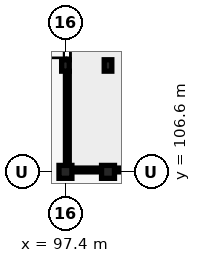
"""IFC4 building model, lengths in metres.
Left out: names, types, materials, properties, quantities, classifications, styles, units other than length and angle.
Written with IfcOpenShell. Run it as: python <this file> out.ifc"""

import sys

from ifc_helpers import new_model, si_unit, direction, frame, frame_2d, origin, origin_2d, place, context, subcontext, project, spatial, rectangle, extrude, element, fill, save


model = new_model("IFC4")
c1 = context("Model", 3, precision=1e-05, world=origin(), true_north=direction((0.0, 1.0)))
c2 = subcontext(c1, "Body", "Model", "MODEL_VIEW")
j1 = project(units=[si_unit("LENGTHUNIT", "METRE"), si_unit("PLANEANGLEUNIT", "RADIAN")], contexts=[c1])
p1 = place(None, origin())
s1 = spatial("IfcSite", under=j1, at=p1, CompositionType="ELEMENT")
p2 = place(p1, origin())
s2 = spatial("IfcBuilding", under=s1, at=p2, CompositionType="ELEMENT")
p3 = place(p2, origin())
s3 = spatial("IfcBuildingStorey", under=s2, at=p3, CompositionType="ELEMENT", Elevation=0.0)
p4 = place(p3, frame((100.2, 106.6, 0.0), z_axis=(0.0, 0.0, 1.0), x_axis=(1.0, 0.0, 0.0)))
e1 = element("IfcColumn", 1, at=p4, inside=s3, PredefinedType="COLUMN", context=c2, shape_type="SweptSolid", body=[
    extrude(rectangle(XDim=0.85, YDim=0.85, at=origin_2d()), origin(), (0.0, 0.0, 1.0), 4.15),
])
p5 = place(p3, frame((100.2, 113.6, 0.0), z_axis=(0.0, 0.0, 1.0), x_axis=(1.0, 0.0, 0.0)))
e2 = element("IfcColumn", 2, at=p5, inside=s3, PredefinedType="COLUMN", context=c2, shape_type="SweptSolid", body=[
    extrude(rectangle(XDim=0.5, YDim=0.75, at=origin_2d()), origin(), (0.0, 0.0, 1.0), 4.15),
])
p6 = place(p3, frame((97.4, 106.6, 0.0), z_axis=(0.0, 0.0, 1.0), x_axis=(1.0, 0.0, 0.0)))
e3 = element("IfcColumn", 3, at=p6, inside=s3, PredefinedType="COLUMN", context=c2, shape_type="SweptSolid", body=[
    extrude(rectangle(XDim=0.85, YDim=0.85, at=origin_2d()), origin(), (0.0, 0.0, 1.0), 4.15),
])
p7 = place(p3, frame((97.4, 113.6, 0.0), z_axis=(0.0, 0.0, 1.0), x_axis=(1.0, 0.0, 0.0)))
e4 = element("IfcColumn", 4, at=p7, inside=s3, PredefinedType="COLUMN", context=c2, shape_type="SweptSolid", body=[
    extrude(rectangle(XDim=0.5, YDim=0.75, at=origin_2d()), origin(), (0.0, 0.0, 1.0), 4.15),
])
p8 = place(p3, frame((103.0, 113.6, 0.0), z_axis=(0.0, 0.0, 1.0), x_axis=(-1.0, 0.0, 0.0)))
e5 = element("IfcWall", 5, at=p8, inside=s3, PredefinedType="STANDARD", context=c2, shape_type="SweptSolid", body=[
    extrude(rectangle(XDim=2.8, YDim=0.2, at=frame_2d((1.4, 0.0))), origin(), (0.0, 0.0, 1.0), 3.492),
])
p9 = place(p8, frame((0.9, 0.0, 0.0)))
e6 = element("IfcOpeningElement", 6, at=p9, cuts=e5, PredefinedType="OPENING", context=c2, shape_type="SweptSolid", body=[
    extrude(rectangle(XDim=1.0, YDim=2.15, at=frame_2d((0.5, 1.075))), frame((0.0, 0.11, 0.0), z_axis=(0.0, -1.0, 0.0), x_axis=(1.0, 0.0, 0.0)), (0.0, 0.0, 1.0), 0.22),
])
p10 = place(p3, frame((100.2, 113.6, 0.0), z_axis=(0.0, 0.0, 1.0), x_axis=(-1.0, 0.0, 0.0)))
e7 = element("IfcWall", 7, at=p10, inside=s3, PredefinedType="STANDARD", context=c2, shape_type="SweptSolid", body=[
    extrude(rectangle(XDim=2.8, YDim=0.2, at=frame_2d((1.4, 0.0))), origin(), (0.0, 0.0, 1.0), 3.492),
])
p11 = place(p3, frame((100.2, 106.8, 0.0), z_axis=(0.0, 0.0, 1.0), x_axis=(0.0, 1.0, 0.0)))
e8 = element("IfcWall", 8, at=p11, inside=s3, PredefinedType="PARTITIONING", context=c2, shape_type="SweptSolid", body=[
    extrude(rectangle(XDim=6.75, YDim=0.15, at=frame_2d((3.375, 0.0))), origin(), (0.0, 0.0, 1.0), 3.492),
])
p12 = place(p11, frame((2.925, 0.0, 0.0)))
e9 = element("IfcOpeningElement", 9, at=p12, cuts=e8, PredefinedType="OPENING", context=c2, shape_type="SweptSolid", body=[
    extrude(rectangle(XDim=0.9, YDim=2.1, at=frame_2d((0.45, 1.05))), frame((0.0, 0.085, 0.0), z_axis=(0.0, -1.0, 0.0), x_axis=(1.0, 0.0, 0.0)), (0.0, 0.0, 1.0), 0.17),
])
p13 = place(p3, frame((102.58, 106.725, 0.0), z_axis=(0.0, 0.0, 1.0), x_axis=(-1.0, 0.0, 0.0)))
e10 = element("IfcWall", 10, at=p13, inside=s3, PredefinedType="STANDARD", context=c2, shape_type="SweptSolid", body=[
    extrude(rectangle(XDim=1.96, YDim=0.25, at=frame_2d((0.98, 0.0))), origin(), (0.0, 0.0, 1.0), 3.692),
])
p14 = place(p13, frame((0.38, 0.0, 0.88)))
e11 = element("IfcOpeningElement", 11, at=p14, cuts=e10, PredefinedType="OPENING", context=c2, shape_type="SweptSolid", body=[
    extrude(rectangle(XDim=1.2, YDim=1.5, at=frame_2d((0.6, 0.75))), frame((0.0, 0.135, 0.0), z_axis=(0.0, -1.0, 0.0), x_axis=(1.0, 0.0, 0.0)), (0.0, 0.0, 1.0), 0.27),
])
p15 = place(p3, frame((99.78, 106.725, 0.0), z_axis=(0.0, 0.0, 1.0), x_axis=(-1.0, 0.0, 0.0)))
e12 = element("IfcWall", 12, at=p15, inside=s3, PredefinedType="STANDARD", context=c2, shape_type="SweptSolid", body=[
    extrude(rectangle(XDim=1.96, YDim=0.25, at=frame_2d((0.98, 0.0))), origin(), (0.0, 0.0, 1.0), 3.692),
])
p16 = place(p15, frame((0.38, 0.0, 0.88)))
e13 = element("IfcOpeningElement", 13, at=p16, cuts=e12, PredefinedType="OPENING", context=c2, shape_type="SweptSolid", body=[
    extrude(rectangle(XDim=1.2, YDim=1.5, at=frame_2d((0.6, 0.75))), frame((0.0, 0.135, 0.0), z_axis=(0.0, -1.0, 0.0), x_axis=(1.0, 0.0, 0.0)), (0.0, 0.0, 1.0), 0.27),
])
p17 = place(p3, frame((97.525, 107.02, 0.0), z_axis=(0.0, 0.0, 1.0), x_axis=(0.0, 1.0, 0.0)))
e14 = element("IfcWall", 14, at=p17, inside=s3, PredefinedType="STANDARD", context=c2, shape_type="SweptSolid", body=[
    extrude(rectangle(XDim=6.201, YDim=0.25, at=frame_2d((3.101, 0.0))), origin(), (0.0, 0.0, 1.0), 3.492),
])
p18 = place(p17, frame((2.33, 0.0, 0.88)))
e15 = element("IfcOpeningElement", 15, at=p18, cuts=e14, PredefinedType="OPENING", context=c2, shape_type="SweptSolid", body=[
    extrude(rectangle(XDim=1.5, YDim=1.65, at=frame_2d((0.75, 0.825))), frame((0.0, 0.135, 0.0), z_axis=(0.0, -1.0, 0.0), x_axis=(1.0, 0.0, 0.0)), (0.0, 0.0, 1.0), 0.27),
])
p19 = place(p3, frame((97.525, 113.979, 0.0), z_axis=(0.0, 0.0, 1.0), x_axis=(0.0, 1.0, 0.0)))
e16 = element("IfcWall", 16, at=p19, inside=s3, PredefinedType="STANDARD", context=c2, shape_type="SweptSolid", body=[
    extrude(rectangle(XDim=1.643, YDim=0.25, at=frame_2d((0.822, 0.0))), origin(), (0.0, 0.0, 1.0), 3.492),
])
p20 = place(p19, frame((0.123, 0.0, 0.0)))
e17 = element("IfcOpeningElement", 17, at=p20, cuts=e16, PredefinedType="OPENING", context=c2, shape_type="SweptSolid", body=[
    extrude(rectangle(XDim=1.4, YDim=2.15, at=frame_2d((0.7, 1.075))), frame((0.0, 0.135, 0.0), z_axis=(0.0, -1.0, 0.0), x_axis=(1.0, 0.0, 0.0)), (0.0, 0.0, 1.0), 0.27),
])
p21 = place(p14, origin())
e18 = element("IfcWindow", 18, at=p21, inside=s3, PartitioningType="SINGLE_PANEL", PredefinedType="WINDOW", context=c2, shape_type="SweptSolid", body=[
    extrude(rectangle(XDim=1.2, YDim=1.5, at=frame_2d((0.6, 0.75))), frame((0.0, 0.03, 0.0), z_axis=(0.0, -1.0, 0.0), x_axis=(1.0, 0.0, 0.0)), (0.0, 0.0, 1.0), 0.06),
])
fill(e11, e18)
p22 = place(p16, origin())
e19 = element("IfcWindow", 19, at=p22, inside=s3, PartitioningType="SINGLE_PANEL", PredefinedType="WINDOW", context=c2, shape_type="SweptSolid", body=[
    extrude(rectangle(XDim=1.2, YDim=1.5, at=frame_2d((0.6, 0.75))), frame((0.0, 0.03, 0.0), z_axis=(0.0, -1.0, 0.0), x_axis=(1.0, 0.0, 0.0)), (0.0, 0.0, 1.0), 0.06),
])
fill(e13, e19)
p23 = place(p18, origin())
e20 = element("IfcWindow", 20, at=p23, inside=s3, PartitioningType="DOUBLE_PANEL_VERTICAL", PredefinedType="WINDOW", context=c2, shape_type="SweptSolid", body=[
    extrude(rectangle(XDim=1.5, YDim=1.65, at=frame_2d((0.75, 0.825))), frame((0.0, 0.03, 0.0), z_axis=(0.0, -1.0, 0.0), x_axis=(1.0, 0.0, 0.0)), (0.0, 0.0, 1.0), 0.06),
])
fill(e15, e20)
p24 = place(p12, frame((0.9, 0.0, 0.0), z_axis=(0.0, 0.0, 1.0), x_axis=(-1.0, 0.0, 0.0)))
e21 = element("IfcDoor", 21, at=p24, inside=s3, OperationType="SINGLE_SWING_RIGHT", PredefinedType="DOOR", context=c2, shape_type="SweptSolid", body=[
    extrude(rectangle(XDim=0.9, YDim=2.1, at=frame_2d((0.45, 1.05))), frame((0.0, 0.025, 0.0), z_axis=(0.0, -1.0, 0.0), x_axis=(1.0, 0.0, 0.0)), (0.0, 0.0, 1.0), 0.05),
])
fill(e9, e21)
p25 = place(p20, origin())
e22 = element("IfcDoor", 22, at=p25, inside=s3, OperationType="SINGLE_SWING_LEFT", PredefinedType="DOOR", context=c2, shape_type="SweptSolid", body=[
    extrude(rectangle(XDim=1.4, YDim=2.15, at=frame_2d((0.7, 1.075))), frame((0.0, 0.025, 0.0), z_axis=(0.0, -1.0, 0.0), x_axis=(1.0, 0.0, 0.0)), (0.0, 0.0, 1.0), 0.05),
])
fill(e17, e22)
save(model, sys.argv[1])
